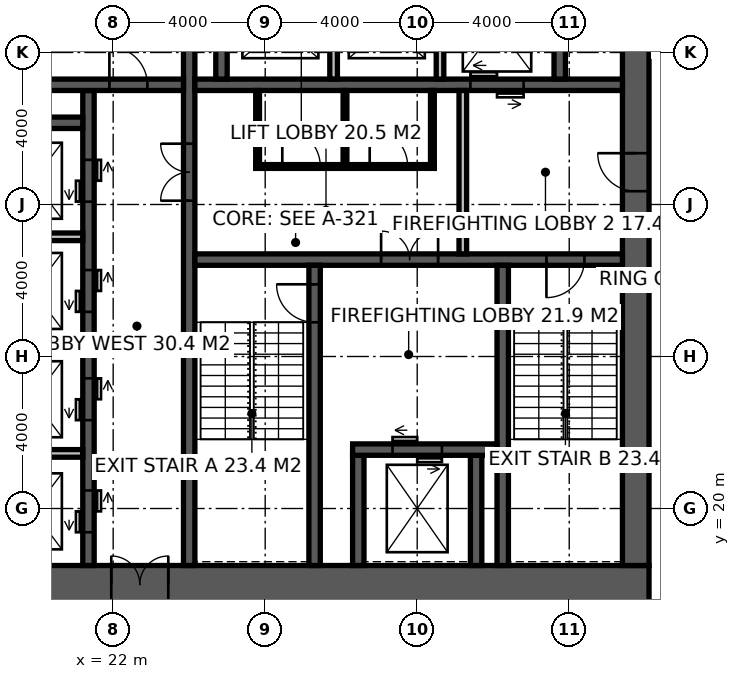
"""IFC4 building model, lengths in metres.
Left out: names, types, materials, properties, quantities, classifications, styles, units other than length and angle.
Written with IfcOpenShell. Run it as: python <this file> out.ifc"""

import sys

from ifc_helpers import new_model, si_unit, direction, frame, frame_2d, origin, place, context, subcontext, project, spatial, rectangle, extrude, element, fill, save


model = new_model("IFC4")
c1 = context("Model", 3, precision=1e-05, world=origin(), true_north=direction((0.0, 1.0)))
c2 = subcontext(c1, "Body", "Model", "MODEL_VIEW")
j1 = project(units=[si_unit("LENGTHUNIT", "METRE"), si_unit("PLANEANGLEUNIT", "RADIAN")], contexts=[c1])
p1 = place(None, origin())
s1 = spatial("IfcSite", under=j1, at=p1, CompositionType="ELEMENT")
p2 = place(p1, origin())
s2 = spatial("IfcBuilding", under=s1, at=p2, CompositionType="ELEMENT")
p3 = place(p2, frame((0.0, 0.0, 101.4)))
s3 = spatial("IfcBuildingStorey", under=s2, at=p3, CompositionType="ELEMENT", Elevation=101.4)
p4 = place(p3, frame((18.5, 18.0, -0.15), z_axis=(0.0, 0.0, 1.0), x_axis=(1.0, 0.0, 0.0)))
e1 = element("IfcWall", 1, at=p4, inside=s3, PredefinedType="SHEAR", context=c2, shape_type="SweptSolid", body=[
    extrude(rectangle(XDim=17.6, YDim=1.0, at=frame_2d((8.8, 0.0))), origin(), (0.0, 0.0, 1.0), 4.0),
])
p5 = place(p4, frame((3.45, 0.0, 0.15)))
e2 = element("IfcOpeningElement", 2, at=p5, cuts=e1, PredefinedType="OPENING", context=c2, shape_type="SweptSolid", body=[
    extrude(rectangle(XDim=1.5, YDim=2.4, at=frame_2d((0.75, 1.2))), frame((0.0, 0.51, 0.0), z_axis=(0.0, -1.0, 0.0), x_axis=(1.0, 0.0, 0.0)), (0.0, 0.0, 1.0), 1.02),
])
p6 = place(p3, frame((35.75, 18.5, -0.15), z_axis=(0.0, 0.0, 1.0), x_axis=(0.0, 1.0, 0.0)))
e3 = element("IfcWall", 3, at=p6, inside=s3, PredefinedType="SHEAR", context=c2, shape_type="SweptSolid", body=[
    extrude(rectangle(XDim=17.0, YDim=0.7, at=frame_2d((8.5, 0.0))), origin(), (0.0, 0.0, 1.0), 4.0),
])
p7 = place(p6, frame((9.85, 0.0, 0.15)))
e4 = element("IfcOpeningElement", 4, at=p7, cuts=e3, PredefinedType="OPENING", context=c2, shape_type="SweptSolid", body=[
    extrude(rectangle(XDim=1.0, YDim=2.2, at=frame_2d((0.5, 1.1))), frame((0.0, 0.36, 0.0), z_axis=(0.0, -1.0, 0.0), x_axis=(1.0, 0.0, 0.0)), (0.0, 0.0, 1.0), 0.72),
])
p8 = place(p3, frame((24.0, 18.5, -0.15), z_axis=(0.0, 0.0, 1.0), x_axis=(0.0, 1.0, 0.0)))
e5 = element("IfcWall", 5, at=p8, inside=s3, PredefinedType="SHEAR", context=c2, shape_type="SweptSolid", body=[
    extrude(rectangle(XDim=17.0, YDim=0.3, at=frame_2d((8.5, 0.0))), origin(), (0.0, 0.0, 1.0), 4.0),
])
p9 = place(p8, frame((9.6, 0.0, 0.15)))
e6 = element("IfcOpeningElement", 6, at=p9, cuts=e5, PredefinedType="OPENING", context=c2, shape_type="SweptSolid", body=[
    extrude(rectangle(XDim=1.5, YDim=2.4, at=frame_2d((0.75, 1.2))), frame((0.0, 0.16, 0.0), z_axis=(0.0, -1.0, 0.0), x_axis=(1.0, 0.0, 0.0)), (0.0, 0.0, 1.0), 0.32),
])
p10 = place(p3, frame((24.15, 26.55, -0.15), z_axis=(0.0, 0.0, 1.0), x_axis=(1.0, 0.0, 0.0)))
e7 = element("IfcWall", 7, at=p10, inside=s3, PredefinedType="SHEAR", context=c2, shape_type="SweptSolid", body=[
    extrude(rectangle(XDim=11.25, YDim=0.3, at=frame_2d((5.625, 0.0))), origin(), (0.0, 0.0, 1.0), 4.0),
])
p11 = place(p10, frame((9.25, 0.0, 0.15)))
e8 = element("IfcOpeningElement", 8, at=p11, cuts=e7, PredefinedType="OPENING", context=c2, shape_type="SweptSolid", body=[
    extrude(rectangle(XDim=1.0, YDim=2.2, at=frame_2d((0.5, 1.1))), frame((0.0, 0.16, 0.0), z_axis=(0.0, -1.0, 0.0), x_axis=(1.0, 0.0, 0.0)), (0.0, 0.0, 1.0), 0.32),
])
p12 = place(p10, frame((4.9, 0.0, 0.15)))
e9 = element("IfcOpeningElement", 9, at=p12, cuts=e7, PredefinedType="OPENING", context=c2, shape_type="SweptSolid", body=[
    extrude(rectangle(XDim=1.5, YDim=2.4, at=frame_2d((0.75, 1.2))), frame((0.0, 0.16, 0.0), z_axis=(0.0, -1.0, 0.0), x_axis=(1.0, 0.0, 0.0)), (0.0, 0.0, 1.0), 0.32),
])
p13 = place(p3, frame((27.3, 18.5, -0.15), z_axis=(0.0, 0.0, 1.0), x_axis=(0.0, 1.0, 0.0)))
e10 = element("IfcWall", 10, at=p13, inside=s3, PredefinedType="SHEAR", context=c2, shape_type="SweptSolid", body=[
    extrude(rectangle(XDim=7.9, YDim=0.3, at=frame_2d((3.95, 0.0))), origin(), (0.0, 0.0, 1.0), 4.0),
])
p14 = place(p13, frame((6.4, 0.0, 0.15)))
e11 = element("IfcOpeningElement", 11, at=p14, cuts=e10, PredefinedType="OPENING", context=c2, shape_type="SweptSolid", body=[
    extrude(rectangle(XDim=1.0, YDim=2.2, at=frame_2d((0.5, 1.1))), frame((0.0, 0.16, 0.0), z_axis=(0.0, -1.0, 0.0), x_axis=(1.0, 0.0, 0.0)), (0.0, 0.0, 1.0), 0.32),
])
p15 = place(p3, frame((32.25, 18.5, -0.15), z_axis=(0.0, 0.0, 1.0), x_axis=(0.0, 1.0, 0.0)))
e12 = element("IfcWall", 12, at=p15, inside=s3, PredefinedType="SHEAR", context=c2, shape_type="SweptSolid", body=[
    extrude(rectangle(XDim=7.9, YDim=0.3, at=frame_2d((3.95, 0.0))), origin(), (0.0, 0.0, 1.0), 4.0),
])
for number, where, z_axis, x_axis in (
    (13, (28.45, 18.5, -0.15), (0.0, 0.0, 1.0), (0.0, 1.0, 0.0)),
    (14, (31.55, 18.5, -0.15), (0.0, 0.0, 1.0), (0.0, 1.0, 0.0)),
):
    element("IfcWall", number, at=place(p3, frame(where, z_axis=z_axis, x_axis=x_axis)), inside=s3, PredefinedType="SHEAR", context=c2, shape_type="SweptSolid", body=[
        extrude(rectangle(XDim=2.9, YDim=0.3, at=frame_2d((1.45, 0.0))), origin(), (0.0, 0.0, 1.0), 4.0),
    ])
p16 = place(p3, frame((28.3, 21.55, -0.15), z_axis=(0.0, 0.0, 1.0), x_axis=(1.0, 0.0, 0.0)))
e15 = element("IfcWall", 15, at=p16, inside=s3, PredefinedType="SHEAR", context=c2, shape_type="SweptSolid", body=[
    extrude(rectangle(XDim=3.8, YDim=0.3, at=frame_2d((1.9, 0.0))), origin(), (0.0, 0.0, 1.0), 4.0),
])
p17 = place(p16, frame((1.05, 0.0, 0.15)))
e16 = element("IfcOpeningElement", 16, at=p17, cuts=e15, PredefinedType="OPENING", context=c2, shape_type="SweptSolid", body=[
    extrude(rectangle(XDim=1.3, YDim=2.4, at=frame_2d((0.65, 1.2))), frame((0.0, 0.16, 0.0), z_axis=(0.0, -1.0, 0.0), x_axis=(1.0, 0.0, 0.0)), (0.0, 0.0, 1.0), 0.32),
])
p18 = place(p3, frame((24.15, 31.15, -0.15), z_axis=(0.0, 0.0, 1.0), x_axis=(1.0, 0.0, 0.0)))
e17 = element("IfcWall", 17, at=p18, inside=s3, PredefinedType="SHEAR", context=c2, shape_type="SweptSolid", body=[
    extrude(rectangle(XDim=11.25, YDim=0.3, at=frame_2d((5.625, 0.0))), origin(), (0.0, 0.0, 1.0), 4.0),
])
p19 = place(p18, frame((7.25, 0.0, 0.15)))
e18 = element("IfcOpeningElement", 18, at=p19, cuts=e17, PredefinedType="OPENING", context=c2, shape_type="SweptSolid", body=[
    extrude(rectangle(XDim=1.4, YDim=2.4, at=frame_2d((0.7, 1.2))), frame((0.0, 0.16, 0.0), z_axis=(0.0, -1.0, 0.0), x_axis=(1.0, 0.0, 0.0)), (0.0, 0.0, 1.0), 0.32),
])
p20 = place(p3, frame((21.35, 18.5, -0.15), z_axis=(0.0, 0.0, 1.0), x_axis=(0.0, 1.0, 0.0)))
e19 = element("IfcWall", 19, at=p20, inside=s3, PredefinedType="SHEAR", context=c2, shape_type="SweptSolid", body=[
    extrude(rectangle(XDim=12.5, YDim=0.3, at=frame_2d((6.25, 0.0))), origin(), (0.0, 0.0, 1.0), 4.0),
])
p21 = place(p20, frame((0.875, 0.0, 0.15)))
e20 = element("IfcOpeningElement", 20, at=p21, cuts=e19, PredefinedType="OPENING", context=c2, shape_type="SweptSolid", body=[
    extrude(rectangle(XDim=1.1, YDim=2.2, at=frame_2d((0.55, 1.1))), frame((0.0, 0.16, 0.0), z_axis=(0.0, -1.0, 0.0), x_axis=(1.0, 0.0, 0.0)), (0.0, 0.0, 1.0), 0.32),
])
p22 = place(p20, frame((3.825, 0.0, 0.15)))
e21 = element("IfcOpeningElement", 21, at=p22, cuts=e19, PredefinedType="OPENING", context=c2, shape_type="SweptSolid", body=[
    extrude(rectangle(XDim=1.1, YDim=2.2, at=frame_2d((0.55, 1.1))), frame((0.0, 0.16, 0.0), z_axis=(0.0, -1.0, 0.0), x_axis=(1.0, 0.0, 0.0)), (0.0, 0.0, 1.0), 0.32),
])
p23 = place(p20, frame((6.675, 0.0, 0.15)))
e22 = element("IfcOpeningElement", 22, at=p23, cuts=e19, PredefinedType="OPENING", context=c2, shape_type="SweptSolid", body=[
    extrude(rectangle(XDim=1.1, YDim=2.2, at=frame_2d((0.55, 1.1))), frame((0.0, 0.16, 0.0), z_axis=(0.0, -1.0, 0.0), x_axis=(1.0, 0.0, 0.0)), (0.0, 0.0, 1.0), 0.32),
])
p24 = place(p20, frame((9.575, 0.0, 0.15)))
e23 = element("IfcOpeningElement", 23, at=p24, cuts=e19, PredefinedType="OPENING", context=c2, shape_type="SweptSolid", body=[
    extrude(rectangle(XDim=1.1, YDim=2.2, at=frame_2d((0.55, 1.1))), frame((0.0, 0.16, 0.0), z_axis=(0.0, -1.0, 0.0), x_axis=(1.0, 0.0, 0.0)), (0.0, 0.0, 1.0), 0.32),
])
p25 = place(p3, frame((18.5, 31.15, -0.15), z_axis=(0.0, 0.0, 1.0), x_axis=(1.0, 0.0, 0.0)))
e24 = element("IfcWall", 24, at=p25, inside=s3, PredefinedType="SHEAR", context=c2, shape_type="SweptSolid", body=[
    extrude(rectangle(XDim=5.35, YDim=0.3, at=frame_2d((2.675, 0.0))), origin(), (0.0, 0.0, 1.0), 4.0),
])
p26 = place(p25, frame((3.4, 0.0, 0.15)))
e25 = element("IfcOpeningElement", 25, at=p26, cuts=e24, PredefinedType="OPENING", context=c2, shape_type="SweptSolid", body=[
    extrude(rectangle(XDim=1.0, YDim=2.2, at=frame_2d((0.5, 1.1))), frame((0.0, 0.16, 0.0), z_axis=(0.0, -1.0, 0.0), x_axis=(1.0, 0.0, 0.0)), (0.0, 0.0, 1.0), 0.32),
])
p27 = place(p3, frame((18.5, 30.15, -0.15), z_axis=(0.0, 0.0, 1.0), x_axis=(1.0, 0.0, 0.0)))
e26 = element("IfcWall", 26, at=p27, inside=s3, PredefinedType="SHEAR", context=c2, shape_type="SweptSolid", body=[
    extrude(rectangle(XDim=2.7, YDim=0.3, at=frame_2d((1.35, 0.0))), origin(), (0.0, 0.0, 1.0), 4.0),
])
for number, where, z_axis, x_axis in (
    (27, (24.85, 31.3, -0.15), (0.0, 0.0, 1.0), (0.0, 1.0, 0.0)),
    (28, (33.75, 31.3, -0.15), (0.0, 0.0, 1.0), (0.0, 1.0, 0.0)),
):
    element("IfcWall", number, at=place(p3, frame(where, z_axis=z_axis, x_axis=x_axis)), inside=s3, PredefinedType="SHEAR", context=c2, shape_type="SweptSolid", body=[
        extrude(rectangle(XDim=4.2, YDim=0.3, at=frame_2d((2.1, 0.0))), origin(), (0.0, 0.0, 1.0), 4.0),
    ])
for number, where, z_axis, x_axis in (
    (29, (27.8, 31.3, -0.15), (0.0, 0.0, 1.0), (0.0, 1.0, 0.0)),
    (30, (30.6, 31.3, -0.15), (0.0, 0.0, 1.0), (0.0, 1.0, 0.0)),
):
    element("IfcWall", number, at=place(p3, frame(where, z_axis=z_axis, x_axis=x_axis)), inside=s3, PredefinedType="SOLIDWALL", context=c2, shape_type="SweptSolid", body=[
        extrude(rectangle(XDim=2.8, YDim=0.2, at=frame_2d((1.4, 0.0))), origin(), (0.0, 0.0, 1.0), 4.0),
    ])
for number, where, z_axis, x_axis in (
    (31, (18.5, 21.45, -0.15), (0.0, 0.0, 1.0), (1.0, 0.0, 0.0)),
    (32, (18.5, 24.3, -0.15), (0.0, 0.0, 1.0), (1.0, 0.0, 0.0)),
    (33, (18.5, 27.15, -0.15), (0.0, 0.0, 1.0), (1.0, 0.0, 0.0)),
):
    element("IfcWall", number, at=place(p3, frame(where, z_axis=z_axis, x_axis=x_axis)), inside=s3, PredefinedType="SOLIDWALL", context=c2, shape_type="SweptSolid", body=[
        extrude(rectangle(XDim=2.7, YDim=0.2, at=frame_2d((1.35, 0.0))), origin(), (0.0, 0.0, 1.0), 4.0),
    ])
p28 = place(p3, frame((31.2, 26.7, 0.0), z_axis=(0.0, 0.0, 1.0), x_axis=(0.0, 1.0, 0.0)))
e34 = element("IfcWall", 34, at=p28, inside=s3, PredefinedType="SOLIDWALL", context=c2, shape_type="SweptSolid", body=[
    extrude(rectangle(XDim=4.3, YDim=0.2, at=frame_2d((2.15, 0.0))), origin(), (0.0, 0.0, 1.0), 3.85),
])
p29 = place(p3, frame((25.75, 29.0, 0.0), z_axis=(0.0, 0.0, 1.0), x_axis=(1.0, 0.0, 0.0)))
e35 = element("IfcWall", 35, at=p29, inside=s3, PredefinedType="PARTITIONING", context=c2, shape_type="SweptSolid", body=[
    extrude(rectangle(XDim=4.7, YDim=0.1, at=frame_2d((2.35, 0.0))), origin(), (0.0, 0.0, 1.0), 3.85),
])
p30 = place(p29, frame((0.7, 0.0, 0.0)))
e36 = element("IfcOpeningElement", 36, at=p30, cuts=e35, PredefinedType="OPENING", context=c2, shape_type="SweptSolid", body=[
    extrude(rectangle(XDim=1.0, YDim=2.2, at=frame_2d((0.5, 1.1))), frame((0.0, 0.06, 0.0), z_axis=(0.0, -1.0, 0.0), x_axis=(1.0, 0.0, 0.0)), (0.0, 0.0, 1.0), 0.12),
])
p31 = place(p29, frame((3.0, 0.0, 0.0)))
e37 = element("IfcOpeningElement", 37, at=p31, cuts=e35, PredefinedType="OPENING", context=c2, shape_type="SweptSolid", body=[
    extrude(rectangle(XDim=1.0, YDim=2.2, at=frame_2d((0.5, 1.1))), frame((0.0, 0.06, 0.0), z_axis=(0.0, -1.0, 0.0), x_axis=(1.0, 0.0, 0.0)), (0.0, 0.0, 1.0), 0.12),
])
for number, where, z_axis, x_axis in (
    (38, (25.8, 29.05, 0.0), (0.0, 0.0, 1.0), (0.0, 1.0, 0.0)),
    (39, (30.4, 29.05, 0.0), (0.0, 0.0, 1.0), (0.0, 1.0, 0.0)),
    (40, (28.1, 29.05, 0.0), (0.0, 0.0, 1.0), (0.0, 1.0, 0.0)),
):
    element("IfcWall", number, at=place(p3, frame(where, z_axis=z_axis, x_axis=x_axis)), inside=s3, PredefinedType="PARTITIONING", context=c2, shape_type="SweptSolid", body=[
        extrude(rectangle(XDim=1.95, YDim=0.1, at=frame_2d((0.975, 0.0))), origin(), (0.0, 0.0, 1.0), 3.85),
    ])
p32 = place(p14, origin())
e41 = element("IfcDoor", 41, at=p32, inside=s3, OperationType="SINGLE_SWING_RIGHT", PredefinedType="DOOR", context=c2, shape_type="SweptSolid", body=[
    extrude(rectangle(XDim=1.0, YDim=2.2, at=frame_2d((0.5, 1.1))), frame((0.0, 0.025, 0.0), z_axis=(0.0, -1.0, 0.0), x_axis=(1.0, 0.0, 0.0)), (0.0, 0.0, 1.0), 0.05),
])
fill(e11, e41)
p33 = place(p11, frame((1.0, 0.0, 0.0), z_axis=(0.0, 0.0, 1.0), x_axis=(-1.0, 0.0, 0.0)))
e42 = element("IfcDoor", 42, at=p33, inside=s3, OperationType="SINGLE_SWING_RIGHT", PredefinedType="DOOR", context=c2, shape_type="SweptSolid", body=[
    extrude(rectangle(XDim=1.0, YDim=2.2, at=frame_2d((0.5, 1.1))), frame((0.0, 0.025, 0.0), z_axis=(0.0, -1.0, 0.0), x_axis=(1.0, 0.0, 0.0)), (0.0, 0.0, 1.0), 0.05),
])
fill(e8, e42)
p34 = place(p7, origin())
e43 = element("IfcDoor", 43, at=p34, inside=s3, OperationType="SINGLE_SWING_RIGHT", PredefinedType="DOOR", context=c2, shape_type="SweptSolid", body=[
    extrude(rectangle(XDim=1.0, YDim=2.2, at=frame_2d((0.5, 1.1))), frame((0.0, 0.025, 0.0), z_axis=(0.0, -1.0, 0.0), x_axis=(1.0, 0.0, 0.0)), (0.0, 0.0, 1.0), 0.05),
])
fill(e4, e43)
p35 = place(p12, origin())
e44 = element("IfcDoor", 44, at=p35, inside=s3, OperationType="DOUBLE_DOOR_DOUBLE_SWING", PredefinedType="DOOR", context=c2, shape_type="SweptSolid", body=[
    extrude(rectangle(XDim=1.5, YDim=2.4, at=frame_2d((0.75, 1.2))), frame((0.0, 0.025, 0.0), z_axis=(0.0, -1.0, 0.0), x_axis=(1.0, 0.0, 0.0)), (0.0, 0.0, 1.0), 0.05),
])
fill(e9, e44)
p36 = place(p9, origin())
e45 = element("IfcDoor", 45, at=p36, inside=s3, OperationType="DOUBLE_DOOR_DOUBLE_SWING", PredefinedType="DOOR", context=c2, shape_type="SweptSolid", body=[
    extrude(rectangle(XDim=1.5, YDim=2.4, at=frame_2d((0.75, 1.2))), frame((0.0, 0.025, 0.0), z_axis=(0.0, -1.0, 0.0), x_axis=(1.0, 0.0, 0.0)), (0.0, 0.0, 1.0), 0.05),
])
fill(e6, e45)
p37 = place(p26, origin())
e46 = element("IfcDoor", 46, at=p37, inside=s3, OperationType="SINGLE_SWING_LEFT", PredefinedType="DOOR", context=c2, shape_type="SweptSolid", body=[
    extrude(rectangle(XDim=1.0, YDim=2.2, at=frame_2d((0.5, 1.1))), frame((0.0, 0.025, 0.0), z_axis=(0.0, -1.0, 0.0), x_axis=(1.0, 0.0, 0.0)), (0.0, 0.0, 1.0), 0.05),
])
fill(e25, e46)
p38 = place(p30, origin())
e47 = element("IfcDoor", 47, at=p38, inside=s3, OperationType="SINGLE_SWING_LEFT", PredefinedType="DOOR", context=c2, shape_type="SweptSolid", body=[
    extrude(rectangle(XDim=1.0, YDim=2.2, at=frame_2d((0.5, 1.1))), frame((0.0, 0.025, 0.0), z_axis=(0.0, -1.0, 0.0), x_axis=(1.0, 0.0, 0.0)), (0.0, 0.0, 1.0), 0.05),
])
fill(e36, e47)
p39 = place(p31, origin())
e48 = element("IfcDoor", 48, at=p39, inside=s3, OperationType="SINGLE_SWING_LEFT", PredefinedType="DOOR", context=c2, shape_type="SweptSolid", body=[
    extrude(rectangle(XDim=1.0, YDim=2.2, at=frame_2d((0.5, 1.1))), frame((0.0, 0.025, 0.0), z_axis=(0.0, -1.0, 0.0), x_axis=(1.0, 0.0, 0.0)), (0.0, 0.0, 1.0), 0.05),
])
fill(e37, e48)
p40 = place(p5, origin())
e49 = element("IfcDoor", 49, at=p40, inside=s3, OperationType="DOUBLE_DOOR_DOUBLE_SWING", PredefinedType="DOOR", context=c2, shape_type="SweptSolid", body=[
    extrude(rectangle(XDim=1.5, YDim=2.4, at=frame_2d((0.75, 1.2))), frame((0.0, 0.025, 0.0), z_axis=(0.0, -1.0, 0.0), x_axis=(1.0, 0.0, 0.0)), (0.0, 0.0, 1.0), 0.05),
])
fill(e2, e49)
p41 = place(p17, origin())
e50 = element("IfcDoor", 50, at=p41, inside=s3, OperationType="DOUBLE_DOOR_SLIDING", PredefinedType="DOOR", context=c2, shape_type="SweptSolid", body=[
    extrude(rectangle(XDim=1.3, YDim=2.4, at=frame_2d((0.65, 1.2))), frame((0.0, 0.025, 0.0), z_axis=(0.0, -1.0, 0.0), x_axis=(1.0, 0.0, 0.0)), (0.0, 0.0, 1.0), 0.05),
])
fill(e16, e50)
p42 = place(p19, origin())
e51 = element("IfcDoor", 51, at=p42, inside=s3, OperationType="DOUBLE_DOOR_SLIDING", PredefinedType="DOOR", context=c2, shape_type="SweptSolid", body=[
    extrude(rectangle(XDim=1.4, YDim=2.4, at=frame_2d((0.7, 1.2))), frame((0.0, 0.025, 0.0), z_axis=(0.0, -1.0, 0.0), x_axis=(1.0, 0.0, 0.0)), (0.0, 0.0, 1.0), 0.05),
])
fill(e18, e51)
p43 = place(p21, origin())
e52 = element("IfcDoor", 52, at=p43, inside=s3, OperationType="DOUBLE_DOOR_SLIDING", PredefinedType="DOOR", context=c2, shape_type="SweptSolid", body=[
    extrude(rectangle(XDim=1.1, YDim=2.2, at=frame_2d((0.55, 1.1))), frame((0.0, 0.025, 0.0), z_axis=(0.0, -1.0, 0.0), x_axis=(1.0, 0.0, 0.0)), (0.0, 0.0, 1.0), 0.05),
])
fill(e20, e52)
p44 = place(p22, origin())
e53 = element("IfcDoor", 53, at=p44, inside=s3, OperationType="DOUBLE_DOOR_SLIDING", PredefinedType="DOOR", context=c2, shape_type="SweptSolid", body=[
    extrude(rectangle(XDim=1.1, YDim=2.2, at=frame_2d((0.55, 1.1))), frame((0.0, 0.025, 0.0), z_axis=(0.0, -1.0, 0.0), x_axis=(1.0, 0.0, 0.0)), (0.0, 0.0, 1.0), 0.05),
])
fill(e21, e53)
p45 = place(p23, origin())
e54 = element("IfcDoor", 54, at=p45, inside=s3, OperationType="DOUBLE_DOOR_SLIDING", PredefinedType="DOOR", context=c2, shape_type="SweptSolid", body=[
    extrude(rectangle(XDim=1.1, YDim=2.2, at=frame_2d((0.55, 1.1))), frame((0.0, 0.025, 0.0), z_axis=(0.0, -1.0, 0.0), x_axis=(1.0, 0.0, 0.0)), (0.0, 0.0, 1.0), 0.05),
])
fill(e22, e54)
p46 = place(p24, origin())
e55 = element("IfcDoor", 55, at=p46, inside=s3, OperationType="DOUBLE_DOOR_SLIDING", PredefinedType="DOOR", context=c2, shape_type="SweptSolid", body=[
    extrude(rectangle(XDim=1.1, YDim=2.2, at=frame_2d((0.55, 1.1))), frame((0.0, 0.025, 0.0), z_axis=(0.0, -1.0, 0.0), x_axis=(1.0, 0.0, 0.0)), (0.0, 0.0, 1.0), 0.05),
])
fill(e23, e55)
save(model, sys.argv[1])
